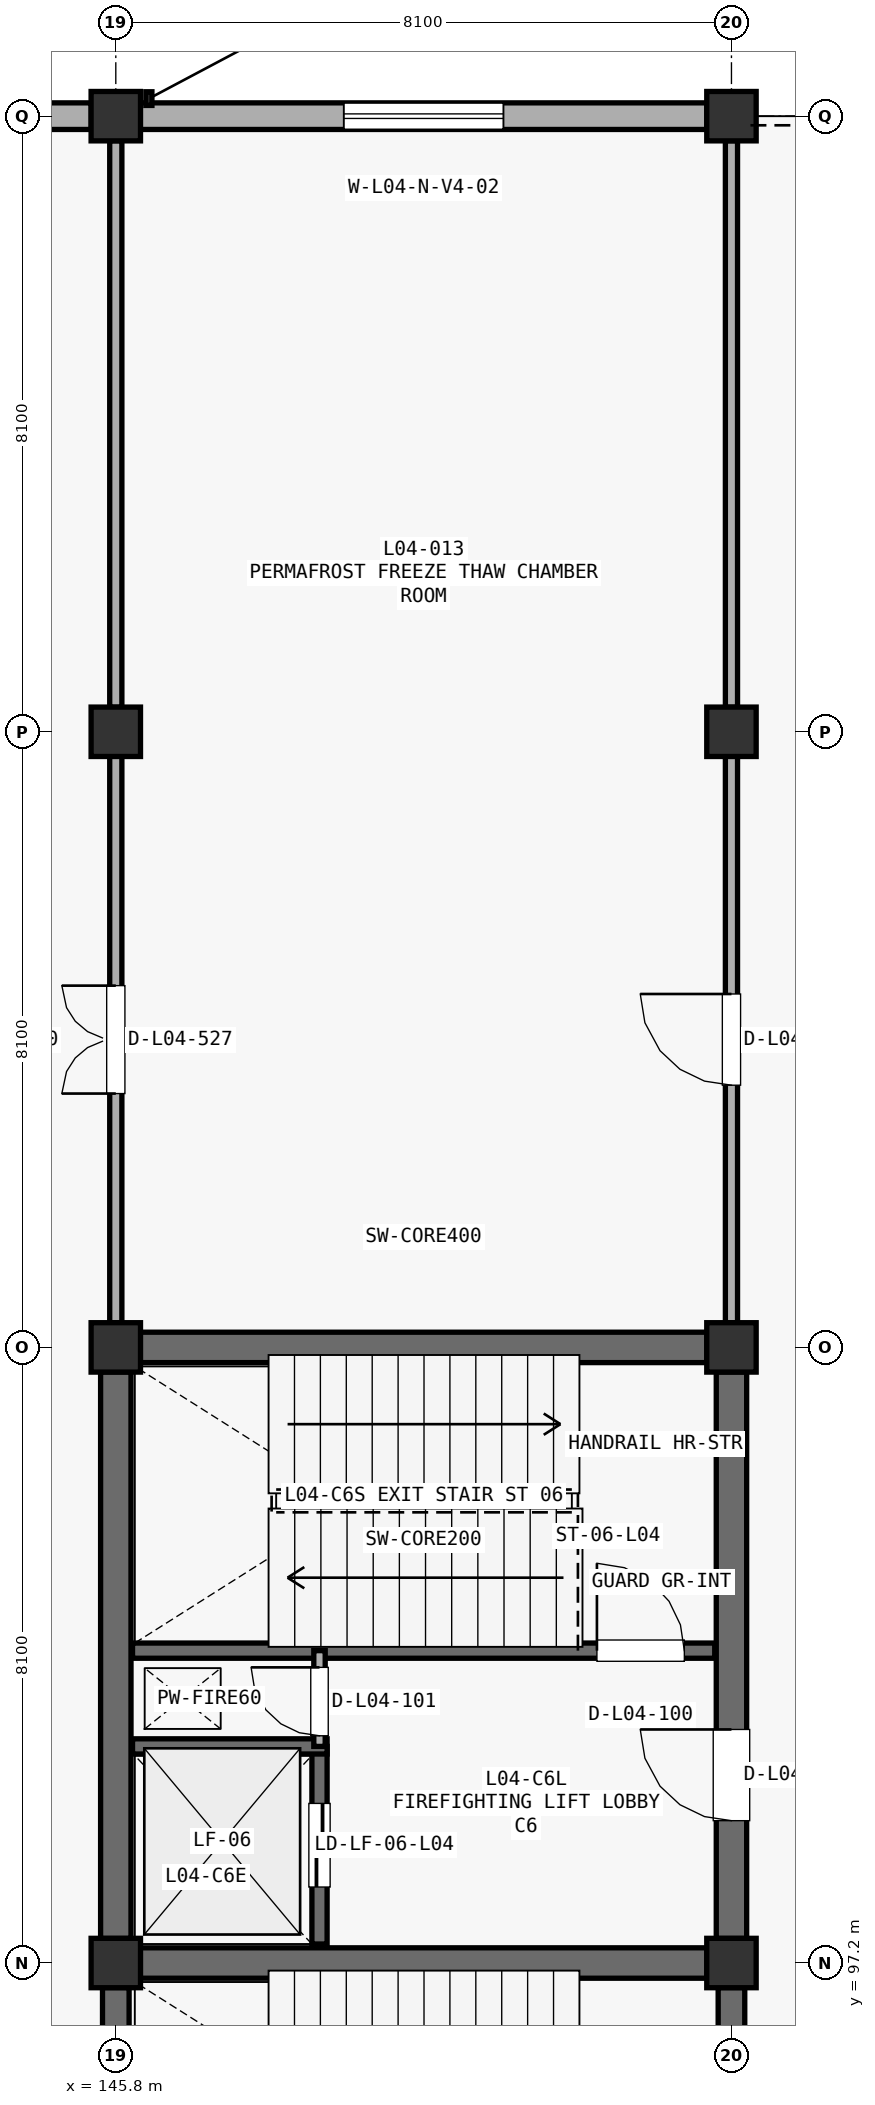
"""IFC4 building model, lengths in metres.
Left out: names, types, materials, properties, quantities, classifications, styles, units other than length and angle.
Written with IfcOpenShell. Run it as: python <this file> out.ifc"""

import sys

from ifc_helpers import new_model, si_unit, direction, frame, frame_2d, origin, origin_2d, place, context, subcontext, project, spatial, rectangle, extrude, element, fill, save


model = new_model("IFC4")
c1 = context("Model", 3, precision=1e-05, world=origin(), true_north=direction((0.0, 1.0)))
c2 = subcontext(c1, "Body", "Model", "MODEL_VIEW")
j1 = project(units=[si_unit("LENGTHUNIT", "METRE"), si_unit("PLANEANGLEUNIT", "RADIAN")], contexts=[c1])
p1 = place(None, origin())
s1 = spatial("IfcSite", under=j1, at=p1, CompositionType="ELEMENT")
p2 = place(p1, origin())
s2 = spatial("IfcBuilding", under=s1, at=p2, CompositionType="ELEMENT")
p3 = place(p2, frame((0.0, 0.0, 18.53)))
s3 = spatial("IfcBuildingStorey", under=s2, at=p3, CompositionType="ELEMENT", Elevation=18.53)
for number, where, z_axis, x_axis in (
    (1, (145.8, 97.2, 0.0), (0.0, 0.0, 1.0), (1.0, 0.0, 0.0)),
    (2, (145.8, 105.3, 0.0), (0.0, 0.0, 1.0), (1.0, 0.0, 0.0)),
    (3, (145.8, 113.4, 0.0), (0.0, 0.0, 1.0), (1.0, 0.0, 0.0)),
    (4, (145.8, 121.5, 0.0), (0.0, 0.0, 1.0), (1.0, 0.0, 0.0)),
    (5, (153.9, 97.2, 0.0), (0.0, 0.0, 1.0), (1.0, 0.0, 0.0)),
    (6, (153.9, 105.3, 0.0), (0.0, 0.0, 1.0), (1.0, 0.0, 0.0)),
    (7, (153.9, 113.4, 0.0), (0.0, 0.0, 1.0), (1.0, 0.0, 0.0)),
    (8, (153.9, 121.5, 0.0), (0.0, 0.0, 1.0), (1.0, 0.0, 0.0)),
):
    element("IfcColumn", number, at=place(p3, frame(where, z_axis=z_axis, x_axis=x_axis)), inside=s3, PredefinedType="COLUMN", context=c2, shape_type="SweptSolid", body=[
        extrude(rectangle(XDim=0.65, YDim=0.65, at=origin_2d()), origin(), (0.0, 0.0, 1.0), 4.42),
    ])
p4 = place(p3, frame((138.023, 121.5, 0.0), z_axis=(0.0, 0.0, 1.0), x_axis=(1.0, 0.0, 0.0)))
e9 = element("IfcWall", 9, at=p4, inside=s3, PredefinedType="STANDARD", context=c2, shape_type="SweptSolid", body=[
    extrude(rectangle(XDim=7.454, YDim=0.35, at=frame_2d((3.727, 0.0))), origin(), (0.0, 0.0, 1.0), 3.562),
])
p5 = place(p4, frame((2.077, 0.0, 0.85)))
e10 = element("IfcOpeningElement", 10, at=p5, cuts=e9, PredefinedType="OPENING", context=c2, shape_type="SweptSolid", body=[
    extrude(rectangle(XDim=3.3, YDim=1.8, at=frame_2d((1.65, 0.9))), frame((0.0, 0.185, 0.0), z_axis=(0.0, -1.0, 0.0), x_axis=(1.0, 0.0, 0.0)), (0.0, 0.0, 1.0), 0.37),
])
p6 = place(p3, frame((146.123, 121.5, 0.0), z_axis=(0.0, 0.0, 1.0), x_axis=(1.0, 0.0, 0.0)))
e11 = element("IfcWall", 11, at=p6, inside=s3, PredefinedType="STANDARD", context=c2, shape_type="SweptSolid", body=[
    extrude(rectangle(XDim=7.454, YDim=0.35, at=frame_2d((3.727, 0.0))), origin(), (0.0, 0.0, 1.0), 3.512),
])
p7 = place(p6, frame((2.677, 0.0, 0.85)))
e12 = element("IfcOpeningElement", 12, at=p7, cuts=e11, PredefinedType="OPENING", context=c2, shape_type="SweptSolid", body=[
    extrude(rectangle(XDim=2.1, YDim=1.9, at=frame_2d((1.05, 0.95))), frame((0.0, 0.185, 0.0), z_axis=(0.0, -1.0, 0.0), x_axis=(1.0, 0.0, 0.0)), (0.0, 0.0, 1.0), 0.37),
])
p8 = place(p3, frame((146.123, 105.3, 0.0), z_axis=(0.0, 0.0, 1.0), x_axis=(1.0, 0.0, 0.0)))
e13 = element("IfcWall", 13, at=p8, inside=s3, PredefinedType="SHEAR", context=c2, shape_type="SweptSolid", body=[
    extrude(rectangle(XDim=7.454, YDim=0.4, at=frame_2d((3.727, 0.0))), origin(), (0.0, 0.0, 1.0), 4.162),
])
p9 = place(p3, frame((145.8, 97.523, 0.0), z_axis=(0.0, 0.0, 1.0), x_axis=(0.0, 1.0, 0.0)))
e14 = element("IfcWall", 14, at=p9, inside=s3, PredefinedType="SHEAR", context=c2, shape_type="SweptSolid", body=[
    extrude(rectangle(XDim=7.454, YDim=0.4, at=frame_2d((3.727, 0.0))), origin(), (0.0, 0.0, 1.0), 4.162),
])
p10 = place(p3, frame((153.9, 97.523, 0.0), z_axis=(0.0, 0.0, 1.0), x_axis=(0.0, 1.0, 0.0)))
e15 = element("IfcWall", 15, at=p10, inside=s3, PredefinedType="SHEAR", context=c2, shape_type="SweptSolid", body=[
    extrude(rectangle(XDim=7.454, YDim=0.4, at=frame_2d((3.727, 0.0))), origin(), (0.0, 0.0, 1.0), 4.162),
])
p11 = place(p10, frame((1.55, 0.0, 0.0)))
e16 = element("IfcOpeningElement", 16, at=p11, cuts=e15, PredefinedType="OPENING", context=c2, shape_type="SweptSolid", body=[
    extrude(rectangle(XDim=1.2, YDim=2.2, at=frame_2d((0.6, 1.1))), frame((0.0, 0.21, 0.0), z_axis=(0.0, -1.0, 0.0), x_axis=(1.0, 0.0, 0.0)), (0.0, 0.0, 1.0), 0.42),
])
p12 = place(p3, frame((146.123, 97.2, 0.0), z_axis=(0.0, 0.0, 1.0), x_axis=(1.0, 0.0, 0.0)))
e17 = element("IfcWall", 17, at=p12, inside=s3, PredefinedType="SHEAR", context=c2, shape_type="SweptSolid", body=[
    extrude(rectangle(XDim=7.454, YDim=0.4, at=frame_2d((3.727, 0.0))), origin(), (0.0, 0.0, 1.0), 4.162),
])
p13 = place(p3, frame((146.02, 101.31, 0.0), z_axis=(0.0, 0.0, 1.0), x_axis=(1.0, 0.0, 0.0)))
e18 = element("IfcWall", 18, at=p13, inside=s3, PredefinedType="SHEAR", context=c2, shape_type="SweptSolid", body=[
    extrude(rectangle(XDim=7.66, YDim=0.2, at=frame_2d((3.83, 0.0))), origin(), (0.0, 0.0, 1.0), 4.162),
])
p14 = place(p13, frame((6.11, 0.0, 0.0)))
e19 = element("IfcOpeningElement", 19, at=p14, cuts=e18, PredefinedType="OPENING", context=c2, shape_type="SweptSolid", body=[
    extrude(rectangle(XDim=1.15, YDim=2.2, at=frame_2d((0.575, 1.1))), frame((0.0, 0.11, 0.0), z_axis=(0.0, -1.0, 0.0), x_axis=(1.0, 0.0, 0.0)), (0.0, 0.0, 1.0), 0.22),
])
p15 = place(p3, frame((148.48, 97.45, 0.0), z_axis=(0.0, 0.0, 1.0), x_axis=(0.0, 1.0, 0.0)))
e20 = element("IfcWall", 20, at=p15, inside=s3, PredefinedType="SHEAR", context=c2, shape_type="SweptSolid", body=[
    extrude(rectangle(XDim=2.6, YDim=0.2, at=frame_2d((1.3, 0.0))), origin(), (0.0, 0.0, 1.0), 4.162),
])
p16 = place(p15, frame((0.75, 0.0, 0.0)))
e21 = element("IfcOpeningElement", 21, at=p16, cuts=e20, PredefinedType="OPENING", context=c2, shape_type="SweptSolid", body=[
    extrude(rectangle(XDim=1.1, YDim=2.2, at=frame_2d((0.55, 1.1))), frame((0.0, 0.11, 0.0), z_axis=(0.0, -1.0, 0.0), x_axis=(1.0, 0.0, 0.0)), (0.0, 0.0, 1.0), 0.22),
])
p17 = place(p3, frame((146.02, 100.05, 0.0), z_axis=(0.0, 0.0, 1.0), x_axis=(1.0, 0.0, 0.0)))
e22 = element("IfcWall", 22, at=p17, inside=s3, PredefinedType="SHEAR", context=c2, shape_type="SweptSolid", body=[
    extrude(rectangle(XDim=2.56, YDim=0.2, at=frame_2d((1.28, 0.0))), origin(), (0.0, 0.0, 1.0), 4.162),
])
p18 = place(p3, frame((148.48, 100.05, 0.0), z_axis=(0.0, 0.0, 1.0), x_axis=(0.0, 1.0, 0.0)))
e23 = element("IfcWall", 23, at=p18, inside=s3, PredefinedType="PARTITIONING", context=c2, shape_type="SweptSolid", body=[
    extrude(rectangle(XDim=1.26, YDim=0.15, at=frame_2d((0.63, 0.0))), origin(), (0.0, 0.0, 1.0), 4.162),
])
p19 = place(p18, frame((0.14, 0.0, 0.0)))
e24 = element("IfcOpeningElement", 24, at=p19, cuts=e23, PredefinedType="OPENING", context=c2, shape_type="SweptSolid", body=[
    extrude(rectangle(XDim=0.9, YDim=2.15, at=frame_2d((0.45, 1.075))), frame((0.0, 0.085, 0.0), z_axis=(0.0, -1.0, 0.0), x_axis=(1.0, 0.0, 0.0)), (0.0, 0.0, 1.0), 0.17),
])
p20 = place(p3, frame((145.8, 89.423, 0.0), z_axis=(0.0, 0.0, 1.0), x_axis=(0.0, 1.0, 0.0)))
e25 = element("IfcWall", 25, at=p20, inside=s3, PredefinedType="SHEAR", context=c2, shape_type="SweptSolid", body=[
    extrude(rectangle(XDim=7.454, YDim=0.35, at=frame_2d((3.727, 0.0))), origin(), (0.0, 0.0, 1.0), 4.162),
])
p21 = place(p3, frame((153.9, 89.423, 0.0), z_axis=(0.0, 0.0, 1.0), x_axis=(0.0, 1.0, 0.0)))
e26 = element("IfcWall", 26, at=p21, inside=s3, PredefinedType="SHEAR", context=c2, shape_type="SweptSolid", body=[
    extrude(rectangle(XDim=7.454, YDim=0.35, at=frame_2d((3.727, 0.0))), origin(), (0.0, 0.0, 1.0), 4.162),
])
p22 = place(p21, frame((1.55, 0.0, 0.0)))
e27 = element("IfcOpeningElement", 27, at=p22, cuts=e26, PredefinedType="OPENING", context=c2, shape_type="SweptSolid", body=[
    extrude(rectangle(XDim=1.2, YDim=2.2, at=frame_2d((0.6, 1.1))), frame((0.0, 0.185, 0.0), z_axis=(0.0, -1.0, 0.0), x_axis=(1.0, 0.0, 0.0)), (0.0, 0.0, 1.0), 0.37),
])
p23 = place(p3, frame((145.8, 105.623, 0.0), z_axis=(0.0, 0.0, 1.0), x_axis=(0.0, 1.0, 0.0)))
e28 = element("IfcWall", 28, at=p23, inside=s3, PredefinedType="PARTITIONING", context=c2, shape_type="SweptSolid", body=[
    extrude(rectangle(XDim=7.454, YDim=0.16, at=frame_2d((3.727, 0.0))), origin(), (0.0, 0.0, 1.0), 3.212),
])
p24 = place(p23, frame((3.017, 0.0, 0.0)))
e29 = element("IfcOpeningElement", 29, at=p24, cuts=e28, PredefinedType="OPENING", context=c2, shape_type="SweptSolid", body=[
    extrude(rectangle(XDim=1.42, YDim=2.25, at=frame_2d((0.71, 1.125))), frame((0.0, 0.09, 0.0), z_axis=(0.0, -1.0, 0.0), x_axis=(1.0, 0.0, 0.0)), (0.0, 0.0, 1.0), 0.18),
])
p25 = place(p3, frame((145.8, 113.723, 0.0), z_axis=(0.0, 0.0, 1.0), x_axis=(0.0, 1.0, 0.0)))
e30 = element("IfcWall", 30, at=p25, inside=s3, PredefinedType="PARTITIONING", context=c2, shape_type="SweptSolid", body=[
    extrude(rectangle(XDim=7.454, YDim=0.16, at=frame_2d((3.727, 0.0))), origin(), (0.0, 0.0, 1.0), 3.412),
])
p26 = place(p3, frame((153.9, 105.623, 0.0), z_axis=(0.0, 0.0, 1.0), x_axis=(0.0, 1.0, 0.0)))
e31 = element("IfcWall", 31, at=p26, inside=s3, PredefinedType="PARTITIONING", context=c2, shape_type="SweptSolid", body=[
    extrude(rectangle(XDim=7.454, YDim=0.16, at=frame_2d((3.727, 0.0))), origin(), (0.0, 0.0, 1.0), 3.512),
])
p27 = place(p26, frame((3.127, 0.0, 0.0)))
e32 = element("IfcOpeningElement", 32, at=p27, cuts=e31, PredefinedType="OPENING", context=c2, shape_type="SweptSolid", body=[
    extrude(rectangle(XDim=1.2, YDim=2.2, at=frame_2d((0.6, 1.1))), frame((0.0, 0.09, 0.0), z_axis=(0.0, -1.0, 0.0), x_axis=(1.0, 0.0, 0.0)), (0.0, 0.0, 1.0), 0.18),
])
p28 = place(p3, frame((153.9, 113.723, 0.0), z_axis=(0.0, 0.0, 1.0), x_axis=(0.0, 1.0, 0.0)))
e33 = element("IfcWall", 33, at=p28, inside=s3, PredefinedType="PARTITIONING", context=c2, shape_type="SweptSolid", body=[
    extrude(rectangle(XDim=7.454, YDim=0.16, at=frame_2d((3.727, 0.0))), origin(), (0.0, 0.0, 1.0), 3.562),
])
p29 = place(p7, origin())
e34 = element("IfcWindow", 34, at=p29, inside=s3, PartitioningType="SINGLE_PANEL", PredefinedType="WINDOW", context=c2, shape_type="SweptSolid", body=[
    extrude(rectangle(XDim=2.1, YDim=1.9, at=frame_2d((1.05, 0.95))), frame((0.0, 0.03, 0.0), z_axis=(0.0, -1.0, 0.0), x_axis=(1.0, 0.0, 0.0)), (0.0, 0.0, 1.0), 0.06),
])
fill(e12, e34)
p30 = place(p11, origin())
e35 = element("IfcDoor", 35, at=p30, inside=s3, OperationType="SINGLE_SWING_RIGHT", PredefinedType="DOOR", context=c2, shape_type="SweptSolid", body=[
    extrude(rectangle(XDim=1.2, YDim=2.2, at=frame_2d((0.6, 1.1))), frame((0.0, 0.025, 0.0), z_axis=(0.0, -1.0, 0.0), x_axis=(1.0, 0.0, 0.0)), (0.0, 0.0, 1.0), 0.05),
])
fill(e16, e35)
p31 = place(p14, origin())
e36 = element("IfcDoor", 36, at=p31, inside=s3, OperationType="SINGLE_SWING_LEFT", PredefinedType="DOOR", context=c2, shape_type="SweptSolid", body=[
    extrude(rectangle(XDim=1.15, YDim=2.2, at=frame_2d((0.575, 1.1))), frame((0.0, 0.025, 0.0), z_axis=(0.0, -1.0, 0.0), x_axis=(1.0, 0.0, 0.0)), (0.0, 0.0, 1.0), 0.05),
])
fill(e19, e36)
p32 = place(p16, origin())
e37 = element("IfcDoor", 37, at=p32, inside=s3, OperationType="SLIDING_TO_LEFT", PredefinedType="DOOR", context=c2, shape_type="SweptSolid", body=[
    extrude(rectangle(XDim=1.1, YDim=2.2, at=frame_2d((0.55, 1.1))), frame((0.0, 0.025, 0.0), z_axis=(0.0, -1.0, 0.0), x_axis=(1.0, 0.0, 0.0)), (0.0, 0.0, 1.0), 0.05),
])
fill(e21, e37)
p33 = place(p19, origin())
e38 = element("IfcDoor", 38, at=p33, inside=s3, OperationType="SINGLE_SWING_RIGHT", PredefinedType="DOOR", context=c2, shape_type="SweptSolid", body=[
    extrude(rectangle(XDim=0.9, YDim=2.15, at=frame_2d((0.45, 1.075))), frame((0.0, 0.025, 0.0), z_axis=(0.0, -1.0, 0.0), x_axis=(1.0, 0.0, 0.0)), (0.0, 0.0, 1.0), 0.05),
])
fill(e24, e38)
p34 = place(p24, origin())
e39 = element("IfcDoor", 39, at=p34, inside=s3, OperationType="DOUBLE_SWING_LEFT", PredefinedType="DOOR", context=c2, shape_type="SweptSolid", body=[
    extrude(rectangle(XDim=1.42, YDim=2.25, at=frame_2d((0.71, 1.125))), frame((0.0, 0.025, 0.0), z_axis=(0.0, -1.0, 0.0), x_axis=(1.0, 0.0, 0.0)), (0.0, 0.0, 1.0), 0.05),
])
fill(e29, e39)
p35 = place(p27, origin())
e40 = element("IfcDoor", 40, at=p35, inside=s3, OperationType="SINGLE_SWING_RIGHT", PredefinedType="DOOR", context=c2, shape_type="SweptSolid", body=[
    extrude(rectangle(XDim=1.2, YDim=2.2, at=frame_2d((0.6, 1.1))), frame((0.0, 0.025, 0.0), z_axis=(0.0, -1.0, 0.0), x_axis=(1.0, 0.0, 0.0)), (0.0, 0.0, 1.0), 0.05),
])
fill(e32, e40)
save(model, sys.argv[1])
